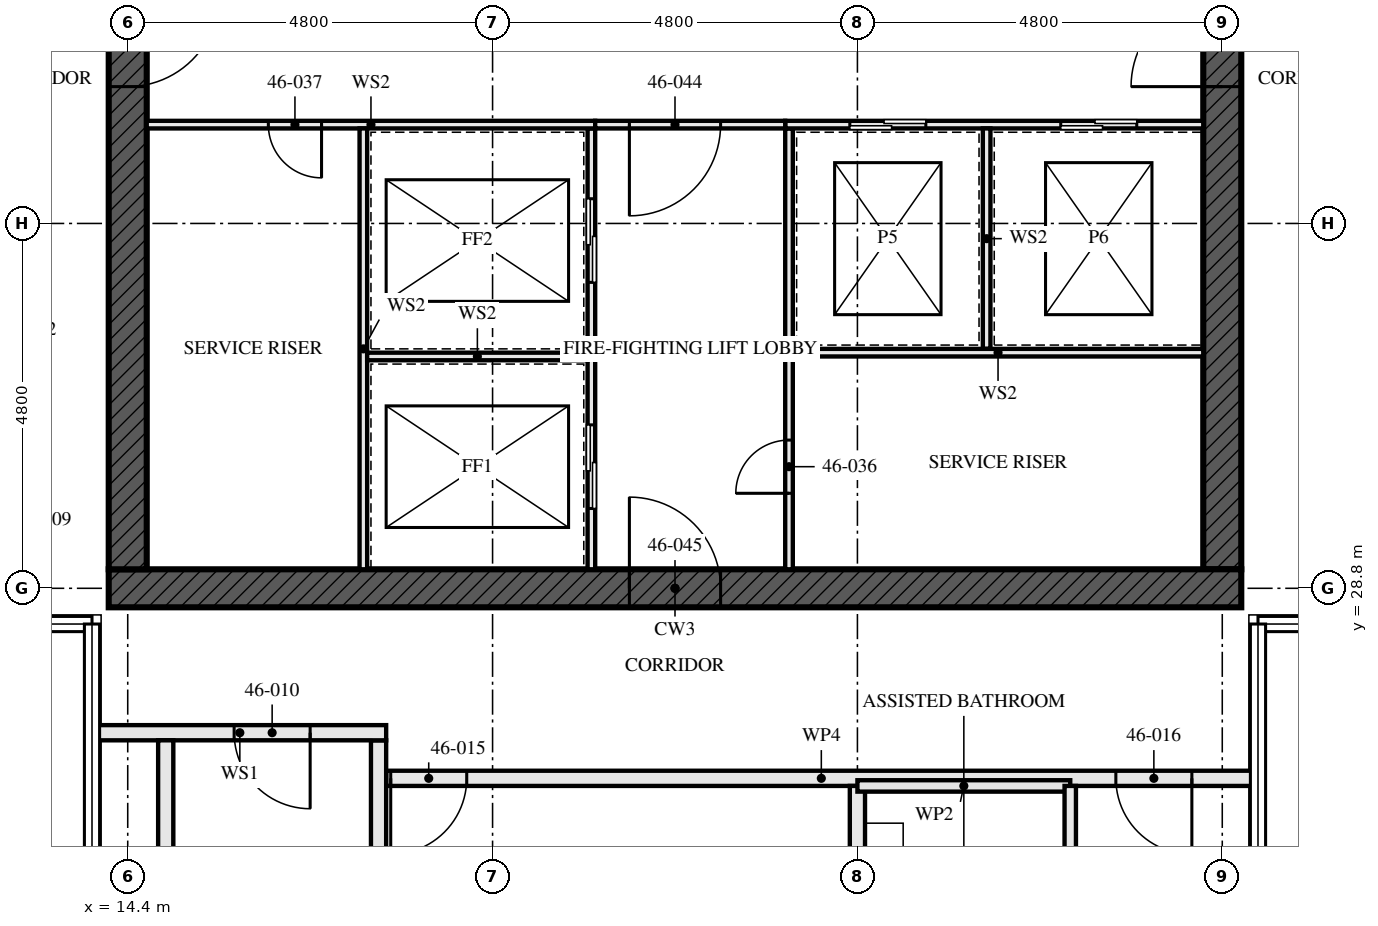
"""IFC4 building model, lengths in metres.
Left out: names, types, materials, properties, quantities, classifications, styles, units other than length and angle.
Written with IfcOpenShell. Run it as: python <this file> out.ifc"""

import sys

from ifc_helpers import new_model, si_unit, direction, frame, frame_2d, origin, place, context, subcontext, project, spatial, rectangle, extrude, element, fill, save


model = new_model("IFC4")
c1 = context("Model", 3, precision=1e-05, world=origin(), true_north=direction((0.0, 1.0)))
c2 = subcontext(c1, "Body", "Model", "MODEL_VIEW")
j1 = project(units=[si_unit("LENGTHUNIT", "METRE"), si_unit("PLANEANGLEUNIT", "RADIAN")], contexts=[c1])
p1 = place(None, origin())
s1 = spatial("IfcSite", under=j1, at=p1, CompositionType="ELEMENT")
p2 = place(p1, origin())
s2 = spatial("IfcBuilding", under=s1, at=p2, CompositionType="ELEMENT")
p3 = place(p2, frame((0.0, 0.0, 169.0)))
s3 = spatial("IfcBuildingStorey", under=s2, at=p3, CompositionType="ELEMENT", Elevation=169.0)
p4 = place(p3, frame((14.15, 28.8, -0.17), z_axis=(0.0, 0.0, 1.0), x_axis=(1.0, 0.0, 0.0)))
e1 = element("IfcWall", 1, at=p4, inside=s3, PredefinedType="SHEAR", context=c2, shape_type="SweptSolid", body=[
    extrude(rectangle(XDim=14.9, YDim=0.5, at=frame_2d((7.45, 0.0))), origin(), (0.0, 0.0, 1.0), 3.5),
])
p5 = place(p4, frame((6.85, 0.0, 0.17)))
e2 = element("IfcOpeningElement", 2, at=p5, cuts=e1, PredefinedType="OPENING", context=c2, shape_type="SweptSolid", body=[
    extrude(rectangle(XDim=1.2, YDim=2.1, at=frame_2d((0.6, 1.05))), frame((0.0, 0.26, 0.0), z_axis=(0.0, -1.0, 0.0), x_axis=(1.0, 0.0, 0.0)), (0.0, 0.0, 1.0), 0.521),
])
p6 = place(p3, frame((14.4, 42.95, -0.17), z_axis=(0.0, 0.0, 1.0), x_axis=(0.0, -1.0, 0.0)))
e3 = element("IfcWall", 3, at=p6, inside=s3, PredefinedType="SHEAR", context=c2, shape_type="SweptSolid", body=[
    extrude(rectangle(XDim=13.9, YDim=0.5, at=frame_2d((6.95, 0.0))), origin(), (0.0, 0.0, 1.0), 3.5),
])
p7 = place(p6, frame((6.35, 0.0, 0.17)))
e4 = element("IfcOpeningElement", 4, at=p7, cuts=e3, PredefinedType="OPENING", context=c2, shape_type="SweptSolid", body=[
    extrude(rectangle(XDim=1.2, YDim=2.1, at=frame_2d((0.6, 1.05))), frame((0.0, 0.26, 0.0), z_axis=(0.0, -1.0, 0.0), x_axis=(1.0, 0.0, 0.0)), (0.0, 0.0, 1.0), 0.521),
])
p8 = place(p3, frame((28.8, 29.05, -0.17), z_axis=(0.0, 0.0, 1.0), x_axis=(0.0, 1.0, 0.0)))
e5 = element("IfcWall", 5, at=p8, inside=s3, PredefinedType="SHEAR", context=c2, shape_type="SweptSolid", body=[
    extrude(rectangle(XDim=13.9, YDim=0.5, at=frame_2d((6.95, 0.0))), origin(), (0.0, 0.0, 1.0), 3.5),
])
p9 = place(p8, frame((6.35, 0.0, 0.17)))
e6 = element("IfcOpeningElement", 6, at=p9, cuts=e5, PredefinedType="OPENING", context=c2, shape_type="SweptSolid", body=[
    extrude(rectangle(XDim=1.2, YDim=2.1, at=frame_2d((0.6, 1.05))), frame((0.0, 0.26, 0.0), z_axis=(0.0, -1.0, 0.0), x_axis=(1.0, 0.0, 0.0)), (0.0, 0.0, 1.0), 0.521),
])
for number, where, z_axis, x_axis in (
    (7, (14.9, 22.1, 0.0), (0.0, 0.0, 1.0), (0.0, 1.0, 0.0)),
    (8, (17.7, 22.1, 0.0), (0.0, 0.0, 1.0), (0.0, 1.0, 0.0)),
):
    element("IfcWall", number, at=place(p3, frame(where, z_axis=z_axis, x_axis=x_axis)), inside=s3, PredefinedType="SOLIDWALL", context=c2, shape_type="SweptSolid", body=[
        extrude(rectangle(XDim=4.7, YDim=0.2, at=frame_2d((2.35, 0.0))), origin(), (0.0, 0.0, 1.0), 2.99),
    ])
p10 = place(p3, frame((13.95, 26.9, 0.0), z_axis=(0.0, 0.0, 1.0), x_axis=(1.0, 0.0, 0.0)))
e9 = element("IfcWall", 9, at=p10, inside=s3, PredefinedType="SOLIDWALL", context=c2, shape_type="SweptSolid", body=[
    extrude(rectangle(XDim=3.85, YDim=0.2, at=frame_2d((1.925, 0.0))), origin(), (0.0, 0.0, 1.0), 2.32),
])
p11 = place(p10, frame((1.85, 0.0, 0.0)))
e10 = element("IfcOpeningElement", 10, at=p11, cuts=e9, PredefinedType="OPENING", context=c2, shape_type="SweptSolid", body=[
    extrude(rectangle(XDim=1.0, YDim=2.1, at=frame_2d((0.5, 1.05))), frame((0.0, 0.111, 0.0), z_axis=(0.0, -1.0, 0.0), x_axis=(1.0, 0.0, 0.0)), (0.0, 0.0, 1.0), 0.221),
])
p12 = place(p3, frame((24.0, 19.52, 0.0), z_axis=(0.0, 0.0, 1.0), x_axis=(0.0, 1.0, 0.0)))
e11 = element("IfcWall", 11, at=p12, inside=s3, PredefinedType="PARTITIONING", context=c2, shape_type="SweptSolid", body=[
    extrude(rectangle(XDim=6.68, YDim=0.2, at=frame_2d((3.34, 0.0))), origin(), (0.0, 0.0, 1.0), 2.55),
])
p13 = place(p3, frame((26.8, 23.2, 0.0), z_axis=(0.0, 0.0, 1.0), x_axis=(0.0, 1.0, 0.0)))
e12 = element("IfcWall", 12, at=p13, inside=s3, PredefinedType="PARTITIONING", context=c2, shape_type="SweptSolid", body=[
    extrude(rectangle(XDim=3.0, YDim=0.15, at=frame_2d((1.5, 0.0))), origin(), (0.0, 0.0, 1.0), 2.55),
])
p14 = place(p13, frame((1.05, 0.0, 0.0)))
e13 = element("IfcOpeningElement", 13, at=p14, cuts=e12, PredefinedType="OPENING", context=c2, shape_type="SweptSolid", body=[
    extrude(rectangle(XDim=0.9, YDim=2.1, at=frame_2d((0.45, 1.05))), frame((0.0, 0.085, 0.0), z_axis=(0.0, -1.0, 0.0), x_axis=(1.0, 0.0, 0.0)), (0.0, 0.0, 1.0), 0.171),
])
p15 = place(p3, frame((24.0, 26.2, 0.0), z_axis=(0.0, 0.0, 1.0), x_axis=(1.0, 0.0, 0.0)))
e14 = element("IfcWall", 14, at=p15, inside=s3, PredefinedType="PARTITIONING", context=c2, shape_type="SweptSolid", body=[
    extrude(rectangle(XDim=2.8, YDim=0.15, at=frame_2d((1.4, 0.0))), origin(), (0.0, 0.0, 1.0), 3.33),
])
p16 = place(p3, frame((17.8, 26.3, 0.0), z_axis=(0.0, 0.0, 1.0), x_axis=(1.0, 0.0, 0.0)))
e15 = element("IfcWall", 15, at=p16, inside=s3, PredefinedType="PARTITIONING", context=c2, shape_type="SweptSolid", body=[
    extrude(rectangle(XDim=11.45, YDim=0.2, at=frame_2d((5.725, 0.0))), origin(), (0.0, 0.0, 1.0), 2.32),
])
p17 = place(p16, frame((0.06, 0.0, 0.0)))
e16 = element("IfcOpeningElement", 16, at=p17, cuts=e15, PredefinedType="OPENING", context=c2, shape_type="SweptSolid", body=[
    extrude(rectangle(XDim=1.0, YDim=2.1, at=frame_2d((0.5, 1.05))), frame((0.0, 0.111, 0.0), z_axis=(0.0, -1.0, 0.0), x_axis=(1.0, 0.0, 0.0)), (0.0, 0.0, 1.0), 0.221),
])
p18 = place(p16, frame((9.6, 0.0, 0.0)))
e17 = element("IfcOpeningElement", 17, at=p18, cuts=e15, PredefinedType="OPENING", context=c2, shape_type="SweptSolid", body=[
    extrude(rectangle(XDim=1.0, YDim=2.1, at=frame_2d((0.5, 1.05))), frame((0.0, 0.111, 0.0), z_axis=(0.0, -1.0, 0.0), x_axis=(1.0, 0.0, 0.0)), (0.0, 0.0, 1.0), 0.221),
])
p19 = place(p3, frame((20.5, 29.05, 0.0), z_axis=(0.0, 0.0, 1.0), x_axis=(0.0, 1.0, 0.0)))
e18 = element("IfcWall", 18, at=p19, inside=s3, PredefinedType="SOLIDWALL", context=c2, shape_type="SweptSolid", body=[
    extrude(rectangle(XDim=5.8, YDim=0.1, at=frame_2d((2.9, 0.0))), origin(), (0.0, 0.0, 1.0), 3.33),
])
p20 = place(p19, frame((0.8, 0.0, 0.0)))
e19 = element("IfcOpeningElement", 19, at=p20, cuts=e18, PredefinedType="OPENING", context=c2, shape_type="SweptSolid", body=[
    extrude(rectangle(XDim=1.1, YDim=2.3, at=frame_2d((0.55, 1.15))), frame((0.0, 0.061, 0.0), z_axis=(0.0, -1.0, 0.0), x_axis=(1.0, 0.0, 0.0)), (0.0, 0.0, 1.0), 0.121),
])
p21 = place(p19, frame((3.775, 0.0, 0.0)))
e20 = element("IfcOpeningElement", 20, at=p21, cuts=e18, PredefinedType="OPENING", context=c2, shape_type="SweptSolid", body=[
    extrude(rectangle(XDim=1.1, YDim=2.3, at=frame_2d((0.55, 1.15))), frame((0.0, 0.061, 0.0), z_axis=(0.0, -1.0, 0.0), x_axis=(1.0, 0.0, 0.0)), (0.0, 0.0, 1.0), 0.121),
])
p22 = place(p3, frame((23.1, 29.05, 0.0), z_axis=(0.0, 0.0, 1.0), x_axis=(0.0, 1.0, 0.0)))
e21 = element("IfcWall", 21, at=p22, inside=s3, PredefinedType="SOLIDWALL", context=c2, shape_type="SweptSolid", body=[
    extrude(rectangle(XDim=5.8, YDim=0.1, at=frame_2d((2.9, 0.0))), origin(), (0.0, 0.0, 1.0), 3.33),
])
p23 = place(p22, frame((1.0, 0.0, 0.0)))
e22 = element("IfcOpeningElement", 22, at=p23, cuts=e21, PredefinedType="OPENING", context=c2, shape_type="SweptSolid", body=[
    extrude(rectangle(XDim=0.7, YDim=2.1, at=frame_2d((0.35, 1.05))), frame((0.0, 0.061, 0.0), z_axis=(0.0, -1.0, 0.0), x_axis=(1.0, 0.0, 0.0)), (0.0, 0.0, 1.0), 0.121),
])
p24 = place(p3, frame((14.65, 34.9, 0.0), z_axis=(0.0, 0.0, 1.0), x_axis=(1.0, 0.0, 0.0)))
e23 = element("IfcWall", 23, at=p24, inside=s3, PredefinedType="SOLIDWALL", context=c2, shape_type="SweptSolid", body=[
    extrude(rectangle(XDim=5.9, YDim=0.1, at=frame_2d((2.95, 0.0))), origin(), (0.0, 0.0, 1.0), 3.33),
])
p25 = place(p24, frame((1.6, 0.0, 0.0)))
e24 = element("IfcOpeningElement", 24, at=p25, cuts=e23, PredefinedType="OPENING", context=c2, shape_type="SweptSolid", body=[
    extrude(rectangle(XDim=0.7, YDim=2.1, at=frame_2d((0.35, 1.05))), frame((0.0, 0.061, 0.0), z_axis=(0.0, -1.0, 0.0), x_axis=(1.0, 0.0, 0.0)), (0.0, 0.0, 1.0), 0.121),
])
p26 = place(p3, frame((23.05, 34.9, 0.0), z_axis=(0.0, 0.0, 1.0), x_axis=(1.0, 0.0, 0.0)))
e25 = element("IfcWall", 25, at=p26, inside=s3, PredefinedType="SOLIDWALL", context=c2, shape_type="SweptSolid", body=[
    extrude(rectangle(XDim=5.5, YDim=0.1, at=frame_2d((2.75, 0.0))), origin(), (0.0, 0.0, 1.0), 3.33),
])
p27 = place(p26, frame((0.85, 0.0, 0.0)))
e26 = element("IfcOpeningElement", 26, at=p27, cuts=e25, PredefinedType="OPENING", context=c2, shape_type="SweptSolid", body=[
    extrude(rectangle(XDim=1.0, YDim=2.1, at=frame_2d((0.5, 1.05))), frame((0.0, 0.061, 0.0), z_axis=(0.0, -1.0, 0.0), x_axis=(1.0, 0.0, 0.0)), (0.0, 0.0, 1.0), 0.121),
])
p28 = place(p26, frame((3.625, 0.0, 0.0)))
e27 = element("IfcOpeningElement", 27, at=p28, cuts=e25, PredefinedType="OPENING", context=c2, shape_type="SweptSolid", body=[
    extrude(rectangle(XDim=1.0, YDim=2.1, at=frame_2d((0.5, 1.05))), frame((0.0, 0.061, 0.0), z_axis=(0.0, -1.0, 0.0), x_axis=(1.0, 0.0, 0.0)), (0.0, 0.0, 1.0), 0.121),
])
p29 = place(p3, frame((20.55, 34.9, 0.0), z_axis=(0.0, 0.0, 1.0), x_axis=(1.0, 0.0, 0.0)))
e28 = element("IfcWall", 28, at=p29, inside=s3, PredefinedType="SOLIDWALL", context=c2, shape_type="SweptSolid", body=[
    extrude(rectangle(XDim=2.5, YDim=0.1, at=frame_2d((1.25, 0.0))), origin(), (0.0, 0.0, 1.0), 3.33),
])
p30 = place(p29, frame((0.45, 0.0, 0.0)))
e29 = element("IfcOpeningElement", 29, at=p30, cuts=e28, PredefinedType="OPENING", context=c2, shape_type="SweptSolid", body=[
    extrude(rectangle(XDim=1.2, YDim=2.1, at=frame_2d((0.6, 1.05))), frame((0.0, 0.061, 0.0), z_axis=(0.0, -1.0, 0.0), x_axis=(1.0, 0.0, 0.0)), (0.0, 0.0, 1.0), 0.121),
])
p31 = place(p3, frame((17.5, 29.05, 0.0), z_axis=(0.0, 0.0, 1.0), x_axis=(0.0, 1.0, 0.0)))
e30 = element("IfcWall", 30, at=p31, inside=s3, PredefinedType="SOLIDWALL", context=c2, shape_type="SweptSolid", body=[
    extrude(rectangle(XDim=5.8, YDim=0.1, at=frame_2d((2.9, 0.0))), origin(), (0.0, 0.0, 1.0), 3.33),
])
p32 = place(p3, frame((17.55, 31.85, 0.0), z_axis=(0.0, 0.0, 1.0), x_axis=(1.0, 0.0, 0.0)))
e31 = element("IfcWall", 31, at=p32, inside=s3, PredefinedType="SOLIDWALL", context=c2, shape_type="SweptSolid", body=[
    extrude(rectangle(XDim=2.9, YDim=0.1, at=frame_2d((1.45, 0.0))), origin(), (0.0, 0.0, 1.0), 3.33),
])
p33 = place(p3, frame((25.7, 31.95, 0.0), z_axis=(0.0, 0.0, 1.0), x_axis=(0.0, 1.0, 0.0)))
e32 = element("IfcWall", 32, at=p33, inside=s3, PredefinedType="SOLIDWALL", context=c2, shape_type="SweptSolid", body=[
    extrude(rectangle(XDim=2.9, YDim=0.1, at=frame_2d((1.45, 0.0))), origin(), (0.0, 0.0, 1.0), 3.33),
])
p34 = place(p3, frame((23.15, 31.9, 0.0), z_axis=(0.0, 0.0, 1.0), x_axis=(1.0, 0.0, 0.0)))
e33 = element("IfcWall", 33, at=p34, inside=s3, PredefinedType="SOLIDWALL", context=c2, shape_type="SweptSolid", body=[
    extrude(rectangle(XDim=5.4, YDim=0.1, at=frame_2d((2.7, 0.0))), origin(), (0.0, 0.0, 1.0), 3.33),
])
p35 = place(p11, frame((1.0, 0.0, 0.0), z_axis=(0.0, 0.0, 1.0), x_axis=(-1.0, 0.0, 0.0)))
e34 = element("IfcDoor", 34, at=p35, inside=s3, OperationType="SINGLE_SWING_RIGHT", PredefinedType="DOOR", context=c2, shape_type="SweptSolid", body=[
    extrude(rectangle(XDim=1.0, YDim=2.1, at=frame_2d((0.5, 1.05))), frame((0.0, 0.032, 0.0), z_axis=(0.0, -1.0, 0.0), x_axis=(1.0, 0.0, 0.0)), (0.0, 0.0, 1.0), 0.064),
])
fill(e10, e34)
p36 = place(p17, frame((1.0, 0.0, 0.0), z_axis=(0.0, 0.0, 1.0), x_axis=(-1.0, 0.0, 0.0)))
e35 = element("IfcDoor", 35, at=p36, inside=s3, OperationType="SINGLE_SWING_LEFT", PredefinedType="DOOR", context=c2, shape_type="SweptSolid", body=[
    extrude(rectangle(XDim=1.0, YDim=2.1, at=frame_2d((0.5, 1.05))), frame((0.0, 0.027, 0.0), z_axis=(0.0, -1.0, 0.0), x_axis=(1.0, 0.0, 0.0)), (0.0, 0.0, 1.0), 0.054),
])
fill(e16, e35)
p37 = place(p18, frame((1.0, 0.0, 0.0), z_axis=(0.0, 0.0, 1.0), x_axis=(-1.0, 0.0, 0.0)))
e36 = element("IfcDoor", 36, at=p37, inside=s3, OperationType="SINGLE_SWING_RIGHT", PredefinedType="DOOR", context=c2, shape_type="SweptSolid", body=[
    extrude(rectangle(XDim=1.0, YDim=2.1, at=frame_2d((0.5, 1.05))), frame((0.0, 0.027, 0.0), z_axis=(0.0, -1.0, 0.0), x_axis=(1.0, 0.0, 0.0)), (0.0, 0.0, 1.0), 0.054),
])
fill(e17, e36)
p38 = place(p20, origin())
e37 = element("IfcDoor", 37, at=p38, inside=s3, OperationType="SLIDING_TO_LEFT", PredefinedType="DOOR", context=c2, shape_type="SweptSolid", body=[
    extrude(rectangle(XDim=1.1, YDim=2.3, at=frame_2d((0.55, 1.15))), frame((0.0, 0.05, 0.0), z_axis=(0.0, -1.0, 0.0), x_axis=(1.0, 0.0, 0.0)), (0.0, 0.0, 1.0), 0.1),
])
fill(e19, e37)
p39 = place(p21, origin())
e38 = element("IfcDoor", 38, at=p39, inside=s3, OperationType="SLIDING_TO_LEFT", PredefinedType="DOOR", context=c2, shape_type="SweptSolid", body=[
    extrude(rectangle(XDim=1.1, YDim=2.3, at=frame_2d((0.55, 1.15))), frame((0.0, 0.05, 0.0), z_axis=(0.0, -1.0, 0.0), x_axis=(1.0, 0.0, 0.0)), (0.0, 0.0, 1.0), 0.1),
])
fill(e20, e38)
p40 = place(p23, origin())
e39 = element("IfcDoor", 39, at=p40, inside=s3, OperationType="SINGLE_SWING_RIGHT", PredefinedType="DOOR", context=c2, shape_type="SweptSolid", body=[
    extrude(rectangle(XDim=0.7, YDim=2.1, at=frame_2d((0.35, 1.05))), frame((0.0, 0.027, 0.0), z_axis=(0.0, -1.0, 0.0), x_axis=(1.0, 0.0, 0.0)), (0.0, 0.0, 1.0), 0.054),
])
fill(e22, e39)
p41 = place(p25, frame((0.7, 0.0, 0.0), z_axis=(0.0, 0.0, 1.0), x_axis=(-1.0, 0.0, 0.0)))
e40 = element("IfcDoor", 40, at=p41, inside=s3, OperationType="SINGLE_SWING_RIGHT", PredefinedType="DOOR", context=c2, shape_type="SweptSolid", body=[
    extrude(rectangle(XDim=0.7, YDim=2.1, at=frame_2d((0.35, 1.05))), frame((0.0, 0.027, 0.0), z_axis=(0.0, -1.0, 0.0), x_axis=(1.0, 0.0, 0.0)), (0.0, 0.0, 1.0), 0.054),
])
fill(e24, e40)
p42 = place(p27, origin())
e41 = element("IfcDoor", 41, at=p42, inside=s3, OperationType="SLIDING_TO_LEFT", PredefinedType="DOOR", context=c2, shape_type="SweptSolid", body=[
    extrude(rectangle(XDim=1.0, YDim=2.1, at=frame_2d((0.5, 1.05))), frame((0.0, 0.05, 0.0), z_axis=(0.0, -1.0, 0.0), x_axis=(1.0, 0.0, 0.0)), (0.0, 0.0, 1.0), 0.1),
])
fill(e26, e41)
p43 = place(p28, origin())
e42 = element("IfcDoor", 42, at=p43, inside=s3, OperationType="SLIDING_TO_LEFT", PredefinedType="DOOR", context=c2, shape_type="SweptSolid", body=[
    extrude(rectangle(XDim=1.0, YDim=2.1, at=frame_2d((0.5, 1.05))), frame((0.0, 0.05, 0.0), z_axis=(0.0, -1.0, 0.0), x_axis=(1.0, 0.0, 0.0)), (0.0, 0.0, 1.0), 0.1),
])
fill(e27, e42)
p44 = place(p30, frame((1.2, 0.0, 0.0), z_axis=(0.0, 0.0, 1.0), x_axis=(-1.0, 0.0, 0.0)))
e43 = element("IfcDoor", 43, at=p44, inside=s3, OperationType="SINGLE_SWING_LEFT", PredefinedType="DOOR", context=c2, shape_type="SweptSolid", body=[
    extrude(rectangle(XDim=1.2, YDim=2.1, at=frame_2d((0.6, 1.05))), frame((0.0, 0.027, 0.0), z_axis=(0.0, -1.0, 0.0), x_axis=(1.0, 0.0, 0.0)), (0.0, 0.0, 1.0), 0.054),
])
fill(e29, e43)
p45 = place(p5, origin())
e44 = element("IfcDoor", 44, at=p45, inside=s3, OperationType="SINGLE_SWING_LEFT", PredefinedType="DOOR", context=c2, shape_type="SweptSolid", body=[
    extrude(rectangle(XDim=1.2, YDim=2.1, at=frame_2d((0.6, 1.05))), frame((0.0, 0.027, 0.0), z_axis=(0.0, -1.0, 0.0), x_axis=(1.0, 0.0, 0.0)), (0.0, 0.0, 1.0), 0.054),
])
fill(e2, e44)
p46 = place(p7, origin())
e45 = element("IfcDoor", 45, at=p46, inside=s3, OperationType="SINGLE_SWING_LEFT", PredefinedType="DOOR", context=c2, shape_type="SweptSolid", body=[
    extrude(rectangle(XDim=1.2, YDim=2.1, at=frame_2d((0.6, 1.05))), frame((0.0, 0.027, 0.0), z_axis=(0.0, -1.0, 0.0), x_axis=(1.0, 0.0, 0.0)), (0.0, 0.0, 1.0), 0.054),
])
fill(e4, e45)
p47 = place(p9, origin())
e46 = element("IfcDoor", 46, at=p47, inside=s3, OperationType="SINGLE_SWING_LEFT", PredefinedType="DOOR", context=c2, shape_type="SweptSolid", body=[
    extrude(rectangle(XDim=1.2, YDim=2.1, at=frame_2d((0.6, 1.05))), frame((0.0, 0.027, 0.0), z_axis=(0.0, -1.0, 0.0), x_axis=(1.0, 0.0, 0.0)), (0.0, 0.0, 1.0), 0.054),
])
fill(e6, e46)
save(model, sys.argv[1])
